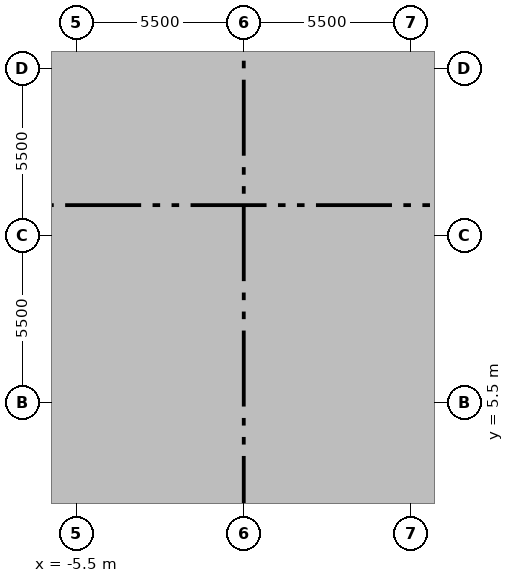
"""IFC4 building model, lengths in metres.
Left out: names, types, materials, properties, quantities, classifications, styles, units other than length and angle.
Written with IfcOpenShell. Run it as: python <this file> out.ifc"""

import sys

from ifc_helpers import new_model, si_unit, direction, frame, frame_2d, origin, origin_2d, place, context, subcontext, project, spatial, rectangle, extrude, source, transform, mapped, element, fill, save


model = new_model("IFC4")
c1 = context("Model", 3, precision=1e-05, world=origin(), true_north=direction((0.0, 1.0)))
c2 = subcontext(c1, "Body", "Model", "MODEL_VIEW")
j1 = project(units=[si_unit("LENGTHUNIT", "METRE"), si_unit("PLANEANGLEUNIT", "RADIAN")], contexts=[c1])
p1 = place(None, origin())
s1 = spatial("IfcSite", under=j1, at=p1, CompositionType="ELEMENT")
p2 = place(p1, origin())
s2 = spatial("IfcBuilding", under=s1, at=p2, CompositionType="ELEMENT")
p3 = place(p2, origin())
s3 = spatial("IfcBuildingStorey", under=s2, at=p3, CompositionType="ELEMENT", Elevation=0.0)
p4 = place(p3, frame((-11.0, 16.175, 0.0), z_axis=(0.0, 0.0, 1.0), x_axis=(1.0, 0.0, 0.0)))
e1 = element("IfcWall", 1, at=p4, inside=s3, PredefinedType="SHEAR", context=c2, shape_type="SweptSolid", body=[
    extrude(rectangle(XDim=22.0, YDim=0.85, at=frame_2d((11.0, 0.0))), origin(), (0.0, 0.0, 1.0), 5.15),
])
p5 = place(p4, frame((3.57, 0.0, 0.0)))
e2 = element("IfcOpeningElement", 2, at=p5, cuts=e1, PredefinedType="OPENING", context=c2, shape_type="SweptSolid", body=[
    extrude(rectangle(XDim=1.3, YDim=2.3, at=frame_2d((0.65, 1.15))), frame((0.0, 0.435, 0.0), z_axis=(0.0, -1.0, 0.0), x_axis=(1.0, 0.0, 0.0)), (0.0, 0.0, 1.0), 0.87),
])
p6 = place(p4, frame((10.0, 0.0, 0.0)))
e3 = element("IfcOpeningElement", 3, at=p6, cuts=e1, PredefinedType="OPENING", context=c2, shape_type="SweptSolid", body=[
    extrude(rectangle(XDim=2.0, YDim=2.4, at=frame_2d((1.0, 1.2))), frame((0.0, 0.435, 0.0), z_axis=(0.0, -1.0, 0.0), x_axis=(1.0, 0.0, 0.0)), (0.0, 0.0, 1.0), 0.87),
])
p7 = place(p3, frame((-5.5, 0.425, 0.0), z_axis=(0.0, 0.0, 1.0), x_axis=(0.0, 1.0, 0.0)))
e4 = element("IfcWall", 4, at=p7, inside=s3, PredefinedType="SHEAR", context=c2, shape_type="SweptSolid", body=[
    extrude(rectangle(XDim=15.75, YDim=0.4, at=frame_2d((7.875, 0.0))), origin(), (0.0, 0.0, 1.0), 5.15),
])
p8 = place(p7, frame((9.075, 0.0, 0.0)))
e5 = element("IfcOpeningElement", 5, at=p8, cuts=e4, PredefinedType="OPENING", context=c2, shape_type="SweptSolid", body=[
    extrude(rectangle(XDim=1.1, YDim=2.2, at=frame_2d((0.55, 1.1))), frame((0.0, 0.21, 0.0), z_axis=(0.0, -1.0, 0.0), x_axis=(1.0, 0.0, 0.0)), (0.0, 0.0, 1.0), 0.42),
])
p9 = place(p3, frame((5.5, 0.425, 0.0), z_axis=(0.0, 0.0, 1.0), x_axis=(0.0, 1.0, 0.0)))
e6 = element("IfcWall", 6, at=p9, inside=s3, PredefinedType="SHEAR", context=c2, shape_type="SweptSolid", body=[
    extrude(rectangle(XDim=15.75, YDim=0.4, at=frame_2d((7.875, 0.0))), origin(), (0.0, 0.0, 1.0), 5.15),
])
p10 = place(p9, frame((9.075, 0.0, 0.0)))
e7 = element("IfcOpeningElement", 7, at=p10, cuts=e6, PredefinedType="OPENING", context=c2, shape_type="SweptSolid", body=[
    extrude(rectangle(XDim=1.1, YDim=2.2, at=frame_2d((0.55, 1.1))), frame((0.0, 0.21, 0.0), z_axis=(0.0, -1.0, 0.0), x_axis=(1.0, 0.0, 0.0)), (0.0, 0.0, 1.0), 0.42),
])
m1 = source(origin(), c2, "Body", "SweptSolid", [
    extrude(rectangle(XDim=0.45, YDim=0.95, at=origin_2d()), origin(), (0.0, 0.0, 1.0), 5.5),
])
for number, where, z_axis, x_axis in (
    (8, (-5.5, 16.05, 0.0), (0.0, 0.0, 1.0), (1.0, 0.0, 0.0)),
    (9, (5.5, 16.05, 0.0), (0.0, 0.0, 1.0), (1.0, 0.0, 0.0)),
):
    element("IfcColumn", number, at=place(p3, frame(where, z_axis=z_axis, x_axis=x_axis)), inside=s3, PredefinedType="PILASTER", context=c2, shape_type="MappedRepresentation", body=[
        mapped(m1, transform((0.0, 0.0, 0.0), scale=1.0)),
    ])
p11 = place(p3, frame((-10.15, 8.35, 0.0), z_axis=(0.0, 0.0, 1.0), x_axis=(1.0, 0.0, 0.0)))
e10 = element("IfcWall", 10, at=p11, inside=s3, PredefinedType="SOLIDWALL", context=c2, shape_type="SweptSolid", body=[
    extrude(rectangle(XDim=4.65, YDim=0.22, at=frame_2d((2.325, 0.0))), origin(), (0.0, 0.0, 1.0), 5.15),
])
p12 = place(p11, frame((1.0, 0.0, 0.0)))
e11 = element("IfcOpeningElement", 11, at=p12, cuts=e10, PredefinedType="OPENING", context=c2, shape_type="SweptSolid", body=[
    extrude(rectangle(XDim=1.15, YDim=2.2, at=frame_2d((0.575, 1.1))), frame((0.0, 0.12, 0.0), z_axis=(0.0, -1.0, 0.0), x_axis=(1.0, 0.0, 0.0)), (0.0, 0.0, 1.0), 0.24),
])
p13 = place(p3, frame((-5.5, 11.87, 0.0), z_axis=(0.0, 0.0, 1.0), x_axis=(-1.0, 0.0, 0.0)))
e12 = element("IfcWall", 12, at=p13, inside=s3, PredefinedType="SOLIDWALL", context=c2, shape_type="SweptSolid", body=[
    extrude(rectangle(XDim=4.65, YDim=0.25, at=frame_2d((2.325, 0.0))), origin(), (0.0, 0.0, 1.0), 5.15),
])
p14 = place(p13, frame((2.95, 0.0, 0.0)))
e13 = element("IfcOpeningElement", 13, at=p14, cuts=e12, PredefinedType="OPENING", context=c2, shape_type="SweptSolid", body=[
    extrude(rectangle(XDim=1.2, YDim=2.25, at=frame_2d((0.6, 1.125))), frame((0.0, 0.135, 0.0), z_axis=(0.0, -1.0, 0.0), x_axis=(1.0, 0.0, 0.0)), (0.0, 0.0, 1.0), 0.27),
])
p15 = place(p3, frame((5.5, 8.35, 0.0), z_axis=(0.0, 0.0, 1.0), x_axis=(1.0, 0.0, 0.0)))
e14 = element("IfcWall", 14, at=p15, inside=s3, PredefinedType="SOLIDWALL", context=c2, shape_type="SweptSolid", body=[
    extrude(rectangle(XDim=4.65, YDim=0.22, at=frame_2d((2.325, 0.0))), origin(), (0.0, 0.0, 1.0), 5.15),
])
p16 = place(p15, frame((2.5, 0.0, 0.0)))
e15 = element("IfcOpeningElement", 15, at=p16, cuts=e14, PredefinedType="OPENING", context=c2, shape_type="SweptSolid", body=[
    extrude(rectangle(XDim=1.15, YDim=2.2, at=frame_2d((0.575, 1.1))), frame((0.0, 0.12, 0.0), z_axis=(0.0, -1.0, 0.0), x_axis=(1.0, 0.0, 0.0)), (0.0, 0.0, 1.0), 0.24),
])
p17 = place(p3, frame((10.15, 11.87, 0.0), z_axis=(0.0, 0.0, 1.0), x_axis=(-1.0, 0.0, 0.0)))
e16 = element("IfcWall", 16, at=p17, inside=s3, PredefinedType="SOLIDWALL", context=c2, shape_type="SweptSolid", body=[
    extrude(rectangle(XDim=4.65, YDim=0.25, at=frame_2d((2.325, 0.0))), origin(), (0.0, 0.0, 1.0), 5.15),
])
p18 = place(p17, frame((0.5, 0.0, 0.0)))
e17 = element("IfcOpeningElement", 17, at=p18, cuts=e16, PredefinedType="OPENING", context=c2, shape_type="SweptSolid", body=[
    extrude(rectangle(XDim=1.2, YDim=2.25, at=frame_2d((0.6, 1.125))), frame((0.0, 0.135, 0.0), z_axis=(0.0, -1.0, 0.0), x_axis=(1.0, 0.0, 0.0)), (0.0, 0.0, 1.0), 0.27),
])
p19 = place(p3, frame((-5.5, 3.05, 0.0), z_axis=(0.0, 0.0, 1.0), x_axis=(1.0, 0.0, 0.0)))
e18 = element("IfcWall", 18, at=p19, inside=s3, PredefinedType="SOLIDWALL", context=c2, shape_type="SweptSolid", body=[
    extrude(rectangle(XDim=7.32, YDim=0.22, at=frame_2d((3.66, 0.0))), origin(), (0.0, 0.0, 1.0), 5.15),
])
p20 = place(p19, frame((0.75, 0.0, 0.0)))
e19 = element("IfcOpeningElement", 19, at=p20, cuts=e18, PredefinedType="OPENING", context=c2, shape_type="SweptSolid", body=[
    extrude(rectangle(XDim=1.1, YDim=2.2, at=frame_2d((0.55, 1.1))), frame((0.0, 0.12, 0.0), z_axis=(0.0, -1.0, 0.0), x_axis=(1.0, 0.0, 0.0)), (0.0, 0.0, 1.0), 0.24),
])
p21 = place(p19, frame((3.15, 0.0, 0.0)))
e20 = element("IfcOpeningElement", 20, at=p21, cuts=e18, PredefinedType="OPENING", context=c2, shape_type="SweptSolid", body=[
    extrude(rectangle(XDim=1.1, YDim=2.2, at=frame_2d((0.55, 1.1))), frame((0.0, 0.12, 0.0), z_axis=(0.0, -1.0, 0.0), x_axis=(1.0, 0.0, 0.0)), (0.0, 0.0, 1.0), 0.24),
])
p22 = place(p19, frame((5.55, 0.0, 0.0)))
e21 = element("IfcOpeningElement", 21, at=p22, cuts=e18, PredefinedType="OPENING", context=c2, shape_type="SweptSolid", body=[
    extrude(rectangle(XDim=1.1, YDim=2.2, at=frame_2d((0.55, 1.1))), frame((0.0, 0.12, 0.0), z_axis=(0.0, -1.0, 0.0), x_axis=(1.0, 0.0, 0.0)), (0.0, 0.0, 1.0), 0.24),
])
p23 = place(p3, frame((1.8, 0.85, 0.0), z_axis=(0.0, 0.0, 1.0), x_axis=(0.0, 1.0, 0.0)))
e22 = element("IfcWall", 22, at=p23, inside=s3, PredefinedType="SOLIDWALL", context=c2, shape_type="SweptSolid", body=[
    extrude(rectangle(XDim=2.2, YDim=0.22, at=frame_2d((1.1, 0.0))), origin(), (0.0, 0.0, 1.0), 5.15),
])
for number, where, z_axis, x_axis in (
    (23, (-3.0, 0.85, 0.0), (0.0, 0.0, 1.0), (0.0, 1.0, 0.0)),
    (24, (-0.6, 0.85, 0.0), (0.0, 0.0, 1.0), (0.0, 1.0, 0.0)),
):
    element("IfcWall", number, at=place(p3, frame(where, z_axis=z_axis, x_axis=x_axis)), inside=s3, PredefinedType="SOLIDWALL", context=c2, shape_type="SweptSolid", body=[
        extrude(rectangle(XDim=2.2, YDim=0.18, at=frame_2d((1.1, 0.0))), origin(), (0.0, 0.0, 1.0), 5.15),
    ])
p24 = place(p3, frame((1.8, 3.16, 0.0), z_axis=(0.0, 0.0, 1.0), x_axis=(0.0, 1.0, 0.0)))
e25 = element("IfcWall", 25, at=p24, inside=s3, PredefinedType="PARTITIONING", context=c2, shape_type="SweptSolid", body=[
    extrude(rectangle(XDim=2.058, YDim=0.165, at=frame_2d((1.029, 0.0))), origin(), (0.0, 0.0, 1.0), 5.142),
])
p25 = place(p3, frame((3.54, 5.383, 0.0), z_axis=(0.0, 0.0, 1.0), x_axis=(0.0, 1.0, 0.0)))
e26 = element("IfcWall", 26, at=p25, inside=s3, PredefinedType="PARTITIONING", context=c2, shape_type="SweptSolid", body=[
    extrude(rectangle(XDim=2.875, YDim=0.165, at=frame_2d((1.438, 0.0))), origin(), (0.0, 0.0, 1.0), 5.142),
])
p26 = place(p25, frame((1.294, 0.0, 0.0)))
e27 = element("IfcOpeningElement", 27, at=p26, cuts=e26, PredefinedType="OPENING", context=c2, shape_type="SweptSolid", body=[
    extrude(rectangle(XDim=0.9, YDim=2.1, at=frame_2d((0.45, 1.05))), frame((0.0, 0.093, 0.0), z_axis=(0.0, -1.0, 0.0), x_axis=(1.0, 0.0, 0.0)), (0.0, 0.0, 1.0), 0.185),
])
p27 = place(p3, frame((3.54, 8.34, 0.0), z_axis=(0.0, 0.0, 1.0), x_axis=(1.0, 0.0, 0.0)))
e28 = element("IfcWall", 28, at=p27, inside=s3, PredefinedType="PARTITIONING", context=c2, shape_type="SweptSolid", body=[
    extrude(rectangle(XDim=1.88, YDim=0.165, at=frame_2d((0.94, 0.0))), origin(), (0.0, 0.0, 1.0), 5.142),
])
p28 = place(p3, frame((1.8, 5.3, 0.0), z_axis=(0.0, 0.0, 1.0), x_axis=(1.0, 0.0, 0.0)))
e29 = element("IfcWall", 29, at=p28, inside=s3, PredefinedType="PARTITIONING", context=c2, shape_type="SweptSolid", body=[
    extrude(rectangle(XDim=3.62, YDim=0.165, at=frame_2d((1.81, 0.0))), origin(), (0.0, 0.0, 1.0), 5.142),
])
p29 = place(p28, frame((0.48, 0.0, 0.0)))
e30 = element("IfcOpeningElement", 30, at=p29, cuts=e29, PredefinedType="OPENING", context=c2, shape_type="SweptSolid", body=[
    extrude(rectangle(XDim=0.9, YDim=2.1, at=frame_2d((0.45, 1.05))), frame((0.0, 0.093, 0.0), z_axis=(0.0, -1.0, 0.0), x_axis=(1.0, 0.0, 0.0)), (0.0, 0.0, 1.0), 0.185),
])
p30 = place(p3, frame((-5.5, 6.0, 0.0), z_axis=(0.0, 0.0, 1.0), x_axis=(1.0, 0.0, 0.0)))
e31 = element("IfcWall", 31, at=p30, inside=s3, PredefinedType="SOLIDWALL", context=c2, shape_type="SweptSolid", body=[
    extrude(rectangle(XDim=7.32, YDim=0.22, at=frame_2d((3.66, 0.0))), origin(), (0.0, 0.0, 1.0), 5.15),
])
p31 = place(p3, frame((-5.5, 8.3, 0.0), z_axis=(0.0, 0.0, 1.0), x_axis=(1.0, 0.0, 0.0)))
e32 = element("IfcWall", 32, at=p31, inside=s3, PredefinedType="SOLIDWALL", context=c2, shape_type="SweptSolid", body=[
    extrude(rectangle(XDim=7.32, YDim=0.22, at=frame_2d((3.66, 0.0))), origin(), (0.0, 0.0, 1.0), 5.15),
])
p32 = place(p31, frame((0.75, 0.0, 0.0)))
e33 = element("IfcOpeningElement", 33, at=p32, cuts=e32, PredefinedType="OPENING", context=c2, shape_type="SweptSolid", body=[
    extrude(rectangle(XDim=1.1, YDim=2.2, at=frame_2d((0.55, 1.1))), frame((0.0, 0.12, 0.0), z_axis=(0.0, -1.0, 0.0), x_axis=(1.0, 0.0, 0.0)), (0.0, 0.0, 1.0), 0.24),
])
p33 = place(p31, frame((3.15, 0.0, 0.0)))
e34 = element("IfcOpeningElement", 34, at=p33, cuts=e32, PredefinedType="OPENING", context=c2, shape_type="SweptSolid", body=[
    extrude(rectangle(XDim=1.1, YDim=2.2, at=frame_2d((0.55, 1.1))), frame((0.0, 0.12, 0.0), z_axis=(0.0, -1.0, 0.0), x_axis=(1.0, 0.0, 0.0)), (0.0, 0.0, 1.0), 0.24),
])
p34 = place(p31, frame((5.55, 0.0, 0.0)))
e35 = element("IfcOpeningElement", 35, at=p34, cuts=e32, PredefinedType="OPENING", context=c2, shape_type="SweptSolid", body=[
    extrude(rectangle(XDim=1.1, YDim=2.2, at=frame_2d((0.55, 1.1))), frame((0.0, 0.12, 0.0), z_axis=(0.0, -1.0, 0.0), x_axis=(1.0, 0.0, 0.0)), (0.0, 0.0, 1.0), 0.24),
])
p35 = place(p3, frame((1.8, 6.0, 0.0), z_axis=(0.0, 0.0, 1.0), x_axis=(0.0, 1.0, 0.0)))
e36 = element("IfcWall", 36, at=p35, inside=s3, PredefinedType="SOLIDWALL", context=c2, shape_type="SweptSolid", body=[
    extrude(rectangle(XDim=2.3, YDim=0.22, at=frame_2d((1.15, 0.0))), origin(), (0.0, 0.0, 1.0), 5.15),
])
for number, where, z_axis, x_axis in (
    (37, (-3.0, 6.0, 0.0), (0.0, 0.0, 1.0), (0.0, 1.0, 0.0)),
    (38, (-0.6, 6.0, 0.0), (0.0, 0.0, 1.0), (0.0, 1.0, 0.0)),
):
    element("IfcWall", number, at=place(p3, frame(where, z_axis=z_axis, x_axis=x_axis)), inside=s3, PredefinedType="SOLIDWALL", context=c2, shape_type="SweptSolid", body=[
        extrude(rectangle(XDim=2.3, YDim=0.18, at=frame_2d((1.15, 0.0))), origin(), (0.0, 0.0, 1.0), 5.15),
    ])
p36 = place(p3, frame((-5.5, 11.32, 0.0), z_axis=(0.0, 0.0, 1.0), x_axis=(1.0, 0.0, 0.0)))
e39 = element("IfcWall", 39, at=p36, inside=s3, PredefinedType="SOLIDWALL", context=c2, shape_type="SweptSolid", body=[
    extrude(rectangle(XDim=7.32, YDim=0.22, at=frame_2d((3.66, 0.0))), origin(), (0.0, 0.0, 1.0), 5.15),
])
p37 = place(p3, frame((-5.5, 13.62, 0.0), z_axis=(0.0, 0.0, 1.0), x_axis=(1.0, 0.0, 0.0)))
e40 = element("IfcWall", 40, at=p37, inside=s3, PredefinedType="SOLIDWALL", context=c2, shape_type="SweptSolid", body=[
    extrude(rectangle(XDim=7.32, YDim=0.22, at=frame_2d((3.66, 0.0))), origin(), (0.0, 0.0, 1.0), 5.15),
])
p38 = place(p37, frame((0.75, 0.0, 0.0)))
e41 = element("IfcOpeningElement", 41, at=p38, cuts=e40, PredefinedType="OPENING", context=c2, shape_type="SweptSolid", body=[
    extrude(rectangle(XDim=1.1, YDim=2.2, at=frame_2d((0.55, 1.1))), frame((0.0, 0.12, 0.0), z_axis=(0.0, -1.0, 0.0), x_axis=(1.0, 0.0, 0.0)), (0.0, 0.0, 1.0), 0.24),
])
p39 = place(p37, frame((3.15, 0.0, 0.0)))
e42 = element("IfcOpeningElement", 42, at=p39, cuts=e40, PredefinedType="OPENING", context=c2, shape_type="SweptSolid", body=[
    extrude(rectangle(XDim=1.1, YDim=2.2, at=frame_2d((0.55, 1.1))), frame((0.0, 0.12, 0.0), z_axis=(0.0, -1.0, 0.0), x_axis=(1.0, 0.0, 0.0)), (0.0, 0.0, 1.0), 0.24),
])
p40 = place(p37, frame((5.55, 0.0, 0.0)))
e43 = element("IfcOpeningElement", 43, at=p40, cuts=e40, PredefinedType="OPENING", context=c2, shape_type="SweptSolid", body=[
    extrude(rectangle(XDim=1.1, YDim=2.2, at=frame_2d((0.55, 1.1))), frame((0.0, 0.12, 0.0), z_axis=(0.0, -1.0, 0.0), x_axis=(1.0, 0.0, 0.0)), (0.0, 0.0, 1.0), 0.24),
])
p41 = place(p3, frame((1.8, 11.32, 0.0), z_axis=(0.0, 0.0, 1.0), x_axis=(0.0, 1.0, 0.0)))
e44 = element("IfcWall", 44, at=p41, inside=s3, PredefinedType="SOLIDWALL", context=c2, shape_type="SweptSolid", body=[
    extrude(rectangle(XDim=2.3, YDim=0.22, at=frame_2d((1.15, 0.0))), origin(), (0.0, 0.0, 1.0), 5.15),
])
for number, where, z_axis, x_axis in (
    (45, (-3.0, 11.32, 0.0), (0.0, 0.0, 1.0), (0.0, 1.0, 0.0)),
    (46, (-0.6, 11.32, 0.0), (0.0, 0.0, 1.0), (0.0, 1.0, 0.0)),
):
    element("IfcWall", number, at=place(p3, frame(where, z_axis=z_axis, x_axis=x_axis)), inside=s3, PredefinedType="SOLIDWALL", context=c2, shape_type="SweptSolid", body=[
        extrude(rectangle(XDim=2.3, YDim=0.18, at=frame_2d((1.15, 0.0))), origin(), (0.0, 0.0, 1.0), 5.15),
    ])
p42 = place(p3, frame((3.54, 11.22, 0.0), z_axis=(0.0, 0.0, 1.0), x_axis=(0.0, 1.0, 0.0)))
e47 = element("IfcWall", 47, at=p42, inside=s3, PredefinedType="PARTITIONING", context=c2, shape_type="SweptSolid", body=[
    extrude(rectangle(XDim=4.53, YDim=0.165, at=frame_2d((2.265, 0.0))), origin(), (0.0, 0.0, 1.0), 5.142),
])
p43 = place(p42, frame((0.55, 0.0, 0.0)))
e48 = element("IfcOpeningElement", 48, at=p43, cuts=e47, PredefinedType="OPENING", context=c2, shape_type="SweptSolid", body=[
    extrude(rectangle(XDim=0.9, YDim=2.1, at=frame_2d((0.45, 1.05))), frame((0.0, 0.093, 0.0), z_axis=(0.0, -1.0, 0.0), x_axis=(1.0, 0.0, 0.0)), (0.0, 0.0, 1.0), 0.185),
])
p44 = place(p42, frame((2.85, 0.0, 0.0)))
e49 = element("IfcOpeningElement", 49, at=p44, cuts=e47, PredefinedType="OPENING", context=c2, shape_type="SweptSolid", body=[
    extrude(rectangle(XDim=0.9, YDim=2.1, at=frame_2d((0.45, 1.05))), frame((0.0, 0.093, 0.0), z_axis=(0.0, -1.0, 0.0), x_axis=(1.0, 0.0, 0.0)), (0.0, 0.0, 1.0), 0.185),
])
p45 = place(p3, frame((3.54, 11.22, 0.0), z_axis=(0.0, 0.0, 1.0), x_axis=(1.0, 0.0, 0.0)))
e50 = element("IfcWall", 50, at=p45, inside=s3, PredefinedType="PARTITIONING", context=c2, shape_type="SweptSolid", body=[
    extrude(rectangle(XDim=1.88, YDim=0.165, at=frame_2d((0.94, 0.0))), origin(), (0.0, 0.0, 1.0), 5.142),
])
p46 = place(p3, frame((3.54, 13.48, 0.0), z_axis=(0.0, 0.0, 1.0), x_axis=(1.0, 0.0, 0.0)))
e51 = element("IfcWall", 51, at=p46, inside=s3, PredefinedType="PARTITIONING", context=c2, shape_type="SweptSolid", body=[
    extrude(rectangle(XDim=1.88, YDim=0.14, at=frame_2d((0.94, 0.0))), origin(), (0.0, 0.0, 1.0), 5.142),
])
m2 = source(origin(), c2, "Body", "SweptSolid", [
    extrude(rectangle(XDim=1.1, YDim=2.2, at=frame_2d((0.55, 1.1))), frame((0.0, 0.025, 0.0), z_axis=(0.0, -1.0, 0.0), x_axis=(1.0, 0.0, 0.0)), (0.0, 0.0, 1.0), 0.05),
])
p47 = place(p8, origin())
e52 = element("IfcDoor", 52, at=p47, inside=s3, OperationType="SINGLE_SWING_RIGHT", PredefinedType="DOOR", context=c2, shape_type="MappedRepresentation", body=[
    mapped(m2, transform((0.0, 0.0, 0.0), scale=1.0)),
])
fill(e5, e52)
m3 = source(origin(), c2, "Body", "SweptSolid", [
    extrude(rectangle(XDim=1.3, YDim=2.3, at=frame_2d((0.65, 1.15))), frame((0.0, 0.025, 0.0), z_axis=(0.0, -1.0, 0.0), x_axis=(1.0, 0.0, 0.0)), (0.0, 0.0, 1.0), 0.05),
])
p48 = place(p5, origin())
e53 = element("IfcDoor", 53, at=p48, inside=s3, OperationType="SLIDING_TO_RIGHT", PredefinedType="DOOR", context=c2, shape_type="MappedRepresentation", body=[
    mapped(m3, transform((0.0, 0.0, 0.0), scale=1.0)),
])
fill(e2, e53)
p49 = place(p10, origin())
e54 = element("IfcDoor", 54, at=p49, inside=s3, OperationType="SINGLE_SWING_RIGHT", PredefinedType="DOOR", context=c2, shape_type="MappedRepresentation", body=[
    mapped(m2, transform((0.0, 0.0, 0.0), scale=1.0)),
])
fill(e7, e54)
m4 = source(origin(), c2, "Body", "SweptSolid", [
    extrude(rectangle(XDim=2.0, YDim=2.4, at=frame_2d((1.0, 1.2))), frame((0.0, 0.025, 0.0), z_axis=(0.0, -1.0, 0.0), x_axis=(1.0, 0.0, 0.0)), (0.0, 0.0, 1.0), 0.05),
])
p50 = place(p6, origin())
e55 = element("IfcDoor", 55, at=p50, inside=s3, OperationType="DOUBLE_DOOR_SINGLE_SWING", PredefinedType="DOOR", context=c2, shape_type="MappedRepresentation", body=[
    mapped(m4, transform((0.0, 0.0, 0.0), scale=1.0)),
])
fill(e3, e55)
m5 = source(origin(), c2, "Body", "SweptSolid", [
    extrude(rectangle(XDim=1.1, YDim=2.2, at=frame_2d((0.55, 1.1))), frame((0.0, 0.025, 0.0), z_axis=(0.0, -1.0, 0.0), x_axis=(1.0, 0.0, 0.0)), (0.0, 0.0, 1.0), 0.05),
])
p51 = place(p20, origin())
e56 = element("IfcDoor", 56, at=p51, inside=s3, OperationType="SLIDING_TO_RIGHT", PredefinedType="DOOR", context=c2, shape_type="MappedRepresentation", body=[
    mapped(m5, transform((0.0, 0.0, 0.0), scale=1.0)),
])
fill(e19, e56)
p52 = place(p21, origin())
e57 = element("IfcDoor", 57, at=p52, inside=s3, OperationType="SLIDING_TO_RIGHT", PredefinedType="DOOR", context=c2, shape_type="MappedRepresentation", body=[
    mapped(m5, transform((0.0, 0.0, 0.0), scale=1.0)),
])
fill(e20, e57)
p53 = place(p22, origin())
e58 = element("IfcDoor", 58, at=p53, inside=s3, OperationType="SLIDING_TO_RIGHT", PredefinedType="DOOR", context=c2, shape_type="MappedRepresentation", body=[
    mapped(m5, transform((0.0, 0.0, 0.0), scale=1.0)),
])
fill(e21, e58)
m6 = source(origin(), c2, "Body", "SweptSolid", [
    extrude(rectangle(XDim=0.9, YDim=2.1, at=frame_2d((0.45, 1.05))), frame((0.0, 0.025, 0.0), z_axis=(0.0, -1.0, 0.0), x_axis=(1.0, 0.0, 0.0)), (0.0, 0.0, 1.0), 0.05),
])
p54 = place(p29, origin())
e59 = element("IfcDoor", 59, at=p54, inside=s3, OperationType="SINGLE_SWING_LEFT", PredefinedType="DOOR", context=c2, shape_type="MappedRepresentation", body=[
    mapped(m6, transform((0.0, 0.0, 0.0), scale=1.0)),
])
fill(e30, e59)
p55 = place(p26, origin())
e60 = element("IfcDoor", 60, at=p55, inside=s3, OperationType="SINGLE_SWING_RIGHT", PredefinedType="DOOR", context=c2, shape_type="MappedRepresentation", body=[
    mapped(m6, transform((0.0, 0.0, 0.0), scale=1.0)),
])
fill(e27, e60)
p56 = place(p32, origin())
e61 = element("IfcDoor", 61, at=p56, inside=s3, OperationType="SLIDING_TO_LEFT", PredefinedType="DOOR", context=c2, shape_type="MappedRepresentation", body=[
    mapped(m5, transform((0.0, 0.0, 0.0), scale=1.0)),
])
fill(e33, e61)
p57 = place(p33, origin())
e62 = element("IfcDoor", 62, at=p57, inside=s3, OperationType="SLIDING_TO_LEFT", PredefinedType="DOOR", context=c2, shape_type="MappedRepresentation", body=[
    mapped(m5, transform((0.0, 0.0, 0.0), scale=1.0)),
])
fill(e34, e62)
p58 = place(p34, origin())
e63 = element("IfcDoor", 63, at=p58, inside=s3, OperationType="SLIDING_TO_LEFT", PredefinedType="DOOR", context=c2, shape_type="MappedRepresentation", body=[
    mapped(m5, transform((0.0, 0.0, 0.0), scale=1.0)),
])
fill(e35, e63)
p59 = place(p38, origin())
e64 = element("IfcDoor", 64, at=p59, inside=s3, OperationType="SLIDING_TO_RIGHT", PredefinedType="DOOR", context=c2, shape_type="MappedRepresentation", body=[
    mapped(m5, transform((0.0, 0.0, 0.0), scale=1.0)),
])
fill(e41, e64)
p60 = place(p39, origin())
e65 = element("IfcDoor", 65, at=p60, inside=s3, OperationType="SLIDING_TO_RIGHT", PredefinedType="DOOR", context=c2, shape_type="MappedRepresentation", body=[
    mapped(m5, transform((0.0, 0.0, 0.0), scale=1.0)),
])
fill(e42, e65)
p61 = place(p40, origin())
e66 = element("IfcDoor", 66, at=p61, inside=s3, OperationType="SLIDING_TO_RIGHT", PredefinedType="DOOR", context=c2, shape_type="MappedRepresentation", body=[
    mapped(m5, transform((0.0, 0.0, 0.0), scale=1.0)),
])
fill(e43, e66)
p62 = place(p43, origin())
e67 = element("IfcDoor", 67, at=p62, inside=s3, OperationType="SINGLE_SWING_LEFT", PredefinedType="DOOR", context=c2, shape_type="MappedRepresentation", body=[
    mapped(m6, transform((0.0, 0.0, 0.0), scale=1.0)),
])
fill(e48, e67)
p63 = place(p44, origin())
e68 = element("IfcDoor", 68, at=p63, inside=s3, OperationType="SINGLE_SWING_RIGHT", PredefinedType="DOOR", context=c2, shape_type="MappedRepresentation", body=[
    mapped(m6, transform((0.0, 0.0, 0.0), scale=1.0)),
])
fill(e49, e68)
save(model, sys.argv[1])
